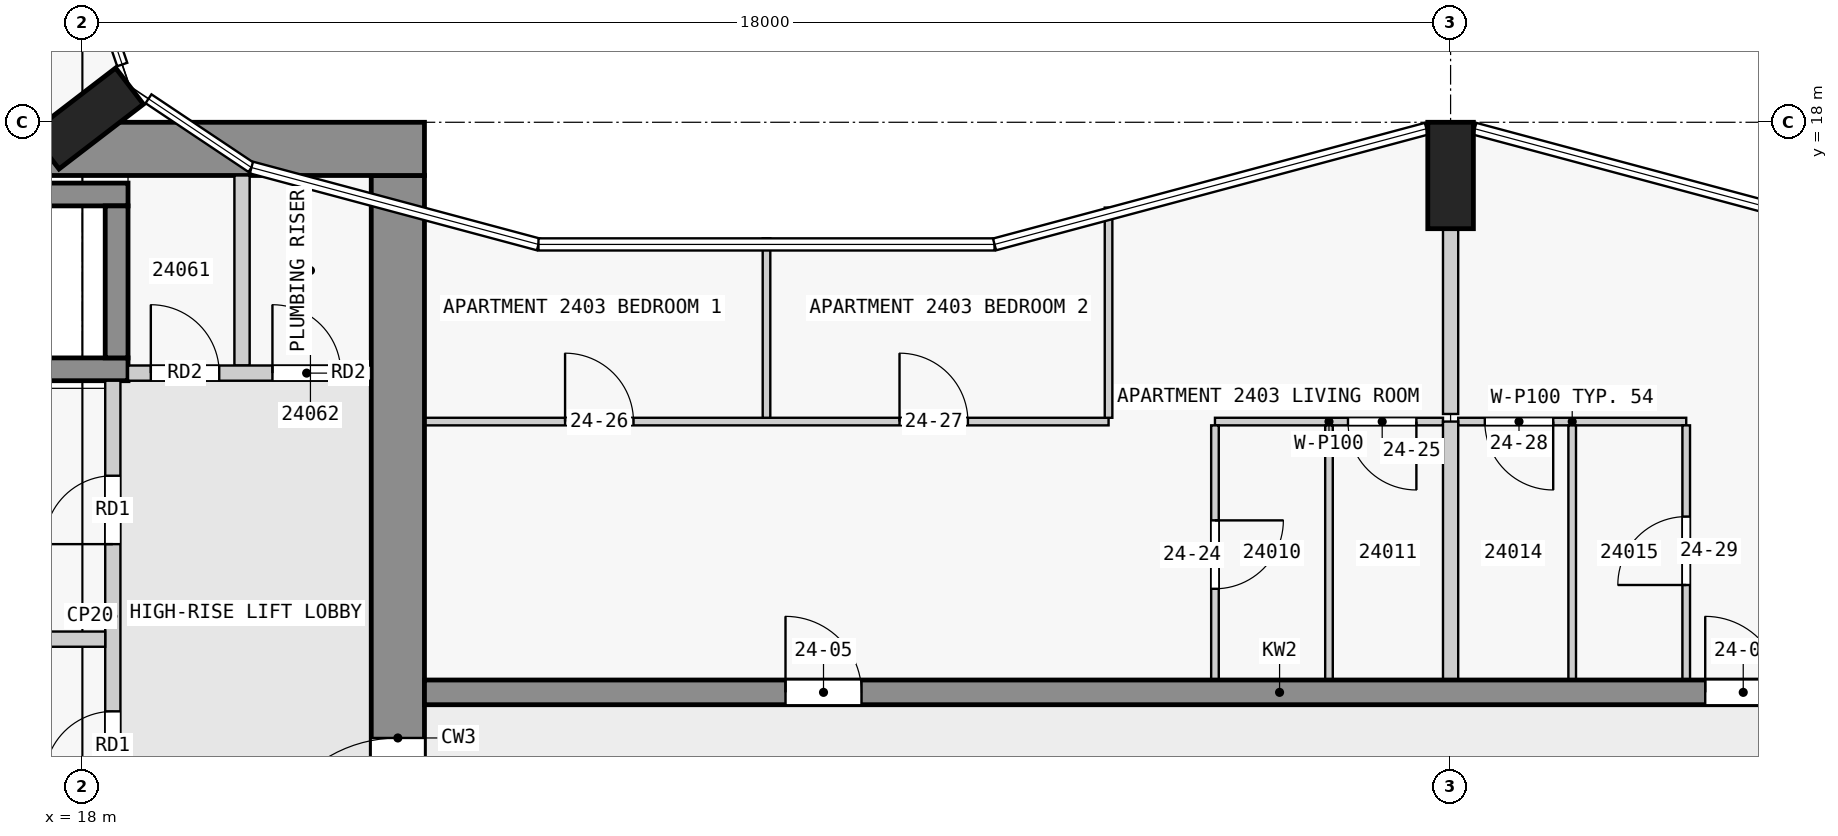
"""IFC4 building model, lengths in metres.
Left out: names, types, materials, properties, quantities, classifications, styles, units other than length and angle.
Written with IfcOpenShell. Run it as: python <this file> out.ifc"""

import sys

from ifc_helpers import new_model, si_unit, direction, frame, frame_2d, origin, origin_2d, place, context, subcontext, project, spatial, rectangle, extrude, element, fill, save


model = new_model("IFC4")
c1 = context("Model", 3, precision=1e-05, world=origin(), true_north=direction((0.0, 1.0)))
c2 = subcontext(c1, "Body", "Model", "MODEL_VIEW")
j1 = project(units=[si_unit("LENGTHUNIT", "METRE"), si_unit("PLANEANGLEUNIT", "RADIAN")], contexts=[c1])
p1 = place(None, origin())
s1 = spatial("IfcSite", under=j1, at=p1, CompositionType="ELEMENT")
p2 = place(p1, origin())
s2 = spatial("IfcBuilding", under=s1, at=p2, CompositionType="ELEMENT")
p3 = place(p2, frame((0.0, 0.0, 95.8)))
s3 = spatial("IfcBuildingStorey", under=s2, at=p3, CompositionType="ELEMENT", Elevation=95.8)
for number, where, z_axis, x_axis in (
    (1, (36.0, 17.3, 0.0), (0.0, 0.0, 1.0), (1.0, 0.0, 0.0)),
    (2, (18.065, 18.05, 0.0), (0.0, 0.0, 1.0), (-0.609, 0.793, 0.0)),
):
    element("IfcColumn", number, at=place(p3, frame(where, z_axis=z_axis, x_axis=x_axis)), inside=s3, PredefinedType="COLUMN", context=c2, shape_type="SweptSolid", body=[
        extrude(rectangle(XDim=0.6, YDim=1.4, at=origin_2d()), origin(), (0.0, 0.0, 1.0), 3.5),
    ])
p4 = place(p3, frame((1.6, 17.65, 0.0), z_axis=(0.0, 0.0, 1.0), x_axis=(1.0, 0.0, 0.0)))
e3 = element("IfcWall", 3, at=p4, inside=s3, PredefinedType="SHEAR", context=c2, shape_type="SweptSolid", body=[
    extrude(rectangle(XDim=20.9, YDim=0.7, at=frame_2d((10.45, 0.0))), origin(), (0.0, 0.0, 1.0), 3.25),
])
p5 = place(p4, frame((6.5, 0.0, 0.0)))
e4 = element("IfcOpeningElement", 4, at=p5, cuts=e3, PredefinedType="OPENING", context=c2, shape_type="SweptSolid", body=[
    extrude(rectangle(XDim=1.8, YDim=2.1, at=frame_2d((0.9, 1.05))), frame((0.0, 0.36, 0.0), z_axis=(0.0, -1.0, 0.0), x_axis=(1.0, 0.0, 0.0)), (0.0, 0.0, 1.0), 0.72),
])
p6 = place(p3, frame((22.15, 2.5, 0.0), z_axis=(0.0, 0.0, 1.0), x_axis=(0.0, 1.0, 0.0)))
e5 = element("IfcWall", 5, at=p6, inside=s3, PredefinedType="SHEAR", context=c2, shape_type="SweptSolid", body=[
    extrude(rectangle(XDim=14.8, YDim=0.7, at=frame_2d((7.4, 0.0))), origin(), (0.0, 0.0, 1.0), 3.25),
])
p7 = place(p6, frame((5.6, 0.0, 0.0)))
e6 = element("IfcOpeningElement", 6, at=p7, cuts=e5, PredefinedType="OPENING", context=c2, shape_type="SweptSolid", body=[
    extrude(rectangle(XDim=1.8, YDim=2.1, at=frame_2d((0.9, 1.05))), frame((0.0, 0.36, 0.0), z_axis=(0.0, -1.0, 0.0), x_axis=(1.0, 0.0, 0.0)), (0.0, 0.0, 1.0), 0.72),
])
for number, where, z_axis, x_axis in (
    (7, (10.8, 17.05, 0.0), (0.0, 0.0, 1.0), (1.0, 0.0, 0.0)),
    (8, (10.8, 14.75, 0.0), (0.0, 0.0, 1.0), (1.0, 0.0, 0.0)),
):
    element("IfcWall", number, at=place(p3, frame(where, z_axis=z_axis, x_axis=x_axis)), inside=s3, PredefinedType="SHEAR", context=c2, shape_type="SweptSolid", body=[
        extrude(rectangle(XDim=7.8, YDim=0.3, at=frame_2d((3.9, 0.0))), origin(), (0.0, 0.0, 1.0), 3.25),
    ])
p8 = place(p3, frame((18.45, 14.9, 0.0), z_axis=(0.0, 0.0, 1.0), x_axis=(0.0, 1.0, 0.0)))
e9 = element("IfcWall", 9, at=p8, inside=s3, PredefinedType="SHEAR", context=c2, shape_type="SweptSolid", body=[
    extrude(rectangle(XDim=2.0, YDim=0.3, at=frame_2d((1.0, 0.0))), origin(), (0.0, 0.0, 1.0), 3.25),
])
p9 = place(p3, frame((22.5, 10.5, 0.0), z_axis=(0.0, 0.0, 1.0), x_axis=(1.0, 0.0, 0.0)))
e10 = element("IfcWall", 10, at=p9, inside=s3, PredefinedType="SHEAR", context=c2, shape_type="SweptSolid", body=[
    extrude(rectangle(XDim=22.5, YDim=0.325, at=frame_2d((11.25, 0.0))), origin(), (0.0, 0.0, 1.0), 3.25),
])
p10 = place(p9, frame((4.75, 0.0, 0.0)))
e11 = element("IfcOpeningElement", 11, at=p10, cuts=e10, PredefinedType="OPENING", context=c2, shape_type="SweptSolid", body=[
    extrude(rectangle(XDim=1.0, YDim=2.1, at=frame_2d((0.5, 1.05))), frame((0.0, 0.172, 0.0), z_axis=(0.0, -1.0, 0.0), x_axis=(1.0, 0.0, 0.0)), (0.0, 0.0, 1.0), 0.345),
])
p11 = place(p9, frame((16.85, 0.0, 0.0)))
e12 = element("IfcOpeningElement", 12, at=p11, cuts=e10, PredefinedType="OPENING", context=c2, shape_type="SweptSolid", body=[
    extrude(rectangle(XDim=1.0, YDim=2.1, at=frame_2d((0.5, 1.05))), frame((0.0, 0.172, 0.0), z_axis=(0.0, -1.0, 0.0), x_axis=(1.0, 0.0, 0.0)), (0.0, 0.0, 1.0), 0.345),
])
p12 = place(p3, frame((18.4, 8.4, 0.0), z_axis=(0.0, 0.0, 1.0), x_axis=(0.0, 1.0, 0.0)))
e13 = element("IfcWall", 13, at=p12, inside=s3, PredefinedType="PARTITIONING", context=c2, shape_type="SweptSolid", body=[
    extrude(rectangle(XDim=6.2, YDim=0.2, at=frame_2d((3.1, 0.0))), origin(), (0.0, 0.0, 1.0), 3.25),
])
p13 = place(p12, frame((0.95, 0.0, 0.0)))
e14 = element("IfcOpeningElement", 14, at=p13, cuts=e13, PredefinedType="OPENING", context=c2, shape_type="SweptSolid", body=[
    extrude(rectangle(XDim=0.9, YDim=2.1, at=frame_2d((0.45, 1.05))), frame((0.0, 0.11, 0.0), z_axis=(0.0, -1.0, 0.0), x_axis=(1.0, 0.0, 0.0)), (0.0, 0.0, 1.0), 0.22),
])
p14 = place(p12, frame((4.05, 0.0, 0.0)))
e15 = element("IfcOpeningElement", 15, at=p14, cuts=e13, PredefinedType="OPENING", context=c2, shape_type="SweptSolid", body=[
    extrude(rectangle(XDim=0.9, YDim=2.1, at=frame_2d((0.45, 1.05))), frame((0.0, 0.11, 0.0), z_axis=(0.0, -1.0, 0.0), x_axis=(1.0, 0.0, 0.0)), (0.0, 0.0, 1.0), 0.22),
])
p15 = place(p3, frame((10.9, 11.2, 0.0), z_axis=(0.0, 0.0, 1.0), x_axis=(1.0, 0.0, 0.0)))
e16 = element("IfcWall", 16, at=p15, inside=s3, PredefinedType="PARTITIONING", context=c2, shape_type="SweptSolid", body=[
    extrude(rectangle(XDim=7.4, YDim=0.2, at=frame_2d((3.7, 0.0))), origin(), (0.0, 0.0, 1.0), 3.25),
])
p16 = place(p3, frame((18.6, 14.7, 0.0), z_axis=(0.0, 0.0, 1.0), x_axis=(1.0, 0.0, 0.0)))
e17 = element("IfcWall", 17, at=p16, inside=s3, PredefinedType="PARTITIONING", context=c2, shape_type="SweptSolid", body=[
    extrude(rectangle(XDim=3.2, YDim=0.2, at=frame_2d((1.6, 0.0))), origin(), (0.0, 0.0, 1.0), 3.25),
])
p17 = place(p16, frame((0.3, 0.0, 0.0)))
e18 = element("IfcOpeningElement", 18, at=p17, cuts=e17, PredefinedType="OPENING", context=c2, shape_type="SweptSolid", body=[
    extrude(rectangle(XDim=0.9, YDim=2.1, at=frame_2d((0.45, 1.05))), frame((0.0, 0.11, 0.0), z_axis=(0.0, -1.0, 0.0), x_axis=(1.0, 0.0, 0.0)), (0.0, 0.0, 1.0), 0.22),
])
p18 = place(p16, frame((1.9, 0.0, 0.0)))
e19 = element("IfcOpeningElement", 19, at=p18, cuts=e17, PredefinedType="OPENING", context=c2, shape_type="SweptSolid", body=[
    extrude(rectangle(XDim=0.9, YDim=2.1, at=frame_2d((0.45, 1.05))), frame((0.0, 0.11, 0.0), z_axis=(0.0, -1.0, 0.0), x_axis=(1.0, 0.0, 0.0)), (0.0, 0.0, 1.0), 0.22),
])
p19 = place(p3, frame((20.1, 14.8, 0.0), z_axis=(0.0, 0.0, 1.0), x_axis=(0.0, 1.0, 0.0)))
e20 = element("IfcWall", 20, at=p19, inside=s3, PredefinedType="PARTITIONING", context=c2, shape_type="SweptSolid", body=[
    extrude(rectangle(XDim=2.5, YDim=0.2, at=frame_2d((1.25, 0.0))), origin(), (0.0, 0.0, 1.0), 3.25),
])
p20 = place(p3, frame((35.9, 14.062, 0.0), z_axis=(0.0, 0.0, 1.0), x_axis=(-1.0, 0.0, 0.0)))
e21 = element("IfcWall", 21, at=p20, inside=s3, PredefinedType="PARTITIONING", context=c2, shape_type="SweptSolid", body=[
    extrude(rectangle(XDim=3.0, YDim=0.1, at=frame_2d((1.5, 0.0))), origin(), (0.0, 0.0, 1.0), 3.25),
])
p21 = place(p20, frame((0.35, 0.0, 0.0)))
e22 = element("IfcOpeningElement", 22, at=p21, cuts=e21, PredefinedType="OPENING", context=c2, shape_type="SweptSolid", body=[
    extrude(rectangle(XDim=0.9, YDim=2.1, at=frame_2d((0.45, 1.05))), frame((0.0, 0.06, 0.0), z_axis=(0.0, -1.0, 0.0), x_axis=(1.0, 0.0, 0.0)), (0.0, 0.0, 1.0), 0.12),
])
p22 = place(p3, frame((39.1, 14.062, 0.0), z_axis=(0.0, 0.0, 1.0), x_axis=(-1.0, 0.0, 0.0)))
e23 = element("IfcWall", 23, at=p22, inside=s3, PredefinedType="PARTITIONING", context=c2, shape_type="SweptSolid", body=[
    extrude(rectangle(XDim=3.0, YDim=0.1, at=frame_2d((1.5, 0.0))), origin(), (0.0, 0.0, 1.0), 3.25),
])
p23 = place(p22, frame((1.75, 0.0, 0.0)))
e24 = element("IfcOpeningElement", 24, at=p23, cuts=e23, PredefinedType="OPENING", context=c2, shape_type="SweptSolid", body=[
    extrude(rectangle(XDim=0.9, YDim=2.1, at=frame_2d((0.45, 1.05))), frame((0.0, 0.06, 0.0), z_axis=(0.0, -1.0, 0.0), x_axis=(1.0, 0.0, 0.0)), (0.0, 0.0, 1.0), 0.12),
])
p24 = place(p3, frame((22.5, 14.062, 0.0), z_axis=(0.0, 0.0, 1.0), x_axis=(1.0, 0.0, 0.0)))
e25 = element("IfcWall", 25, at=p24, inside=s3, PredefinedType="PARTITIONING", context=c2, shape_type="SweptSolid", body=[
    extrude(rectangle(XDim=9.0, YDim=0.1, at=frame_2d((4.5, 0.0))), origin(), (0.0, 0.0, 1.0), 3.25),
])
p25 = place(p24, frame((1.85, 0.0, 0.0)))
e26 = element("IfcOpeningElement", 26, at=p25, cuts=e25, PredefinedType="OPENING", context=c2, shape_type="SweptSolid", body=[
    extrude(rectangle(XDim=0.9, YDim=2.1, at=frame_2d((0.45, 1.05))), frame((0.0, 0.06, 0.0), z_axis=(0.0, -1.0, 0.0), x_axis=(1.0, 0.0, 0.0)), (0.0, 0.0, 1.0), 0.12),
])
p26 = place(p24, frame((6.25, 0.0, 0.0)))
e27 = element("IfcOpeningElement", 27, at=p26, cuts=e25, PredefinedType="OPENING", context=c2, shape_type="SweptSolid", body=[
    extrude(rectangle(XDim=0.9, YDim=2.1, at=frame_2d((0.45, 1.05))), frame((0.0, 0.06, 0.0), z_axis=(0.0, -1.0, 0.0), x_axis=(1.0, 0.0, 0.0)), (0.0, 0.0, 1.0), 0.12),
])
p27 = place(p3, frame((27.0, 14.113, 0.0), z_axis=(0.0, 0.0, 1.0), x_axis=(0.0, 1.0, 0.0)))
e28 = element("IfcWall", 28, at=p27, inside=s3, PredefinedType="PARTITIONING", context=c2, shape_type="SweptSolid", body=[
    extrude(rectangle(XDim=2.361, YDim=0.1, at=frame_2d((1.18, 0.0))), origin(), (0.0, 0.0, 1.0), 3.25),
])
p28 = place(p3, frame((31.5, 14.113, 0.0), z_axis=(0.0, 0.0, 1.0), x_axis=(0.0, 1.0, 0.0)))
e29 = element("IfcWall", 29, at=p28, inside=s3, PredefinedType="PARTITIONING", context=c2, shape_type="SweptSolid", body=[
    extrude(rectangle(XDim=2.765, YDim=0.1, at=frame_2d((1.383, 0.0))), origin(), (0.0, 0.0, 1.0), 3.25),
])
p29 = place(p3, frame((32.9, 14.012, 0.0), z_axis=(0.0, 0.0, 1.0), x_axis=(0.0, -1.0, 0.0)))
e30 = element("IfcWall", 30, at=p29, inside=s3, PredefinedType="PARTITIONING", context=c2, shape_type="SweptSolid", body=[
    extrude(rectangle(XDim=3.35, YDim=0.1, at=frame_2d((1.675, 0.0))), origin(), (0.0, 0.0, 1.0), 3.25),
])
p30 = place(p29, frame((1.25, 0.0, 0.0)))
e31 = element("IfcOpeningElement", 31, at=p30, cuts=e30, PredefinedType="OPENING", context=c2, shape_type="SweptSolid", body=[
    extrude(rectangle(XDim=0.9, YDim=2.1, at=frame_2d((0.45, 1.05))), frame((0.0, 0.06, 0.0), z_axis=(0.0, -1.0, 0.0), x_axis=(1.0, 0.0, 0.0)), (0.0, 0.0, 1.0), 0.12),
])
p31 = place(p3, frame((34.4, 10.663, 0.0), z_axis=(0.0, 0.0, 1.0), x_axis=(0.0, 1.0, 0.0)))
e32 = element("IfcWall", 32, at=p31, inside=s3, PredefinedType="PARTITIONING", context=c2, shape_type="SweptSolid", body=[
    extrude(rectangle(XDim=3.35, YDim=0.1, at=frame_2d((1.675, 0.0))), origin(), (0.0, 0.0, 1.0), 3.25),
])
p32 = place(p3, frame((36.0, 16.6, 0.0), z_axis=(0.0, 0.0, 1.0), x_axis=(0.0, -1.0, 0.0)))
e33 = element("IfcWall", 33, at=p32, inside=s3, PredefinedType="PARTITIONING", context=c2, shape_type="SweptSolid", body=[
    extrude(rectangle(XDim=2.438, YDim=0.2, at=frame_2d((1.219, 0.0))), origin(), (0.0, 0.0, 1.0), 3.25),
])
p33 = place(p3, frame((36.0, 10.663, 0.0), z_axis=(0.0, 0.0, 1.0), x_axis=(0.0, 1.0, 0.0)))
e34 = element("IfcWall", 34, at=p33, inside=s3, PredefinedType="PARTITIONING", context=c2, shape_type="SweptSolid", body=[
    extrude(rectangle(XDim=3.4, YDim=0.2, at=frame_2d((1.7, 0.0))), origin(), (0.0, 0.0, 1.0), 3.25),
])
p34 = place(p3, frame((37.6, 10.663, 0.0), z_axis=(0.0, 0.0, 1.0), x_axis=(0.0, 1.0, 0.0)))
e35 = element("IfcWall", 35, at=p34, inside=s3, PredefinedType="PARTITIONING", context=c2, shape_type="SweptSolid", body=[
    extrude(rectangle(XDim=3.35, YDim=0.1, at=frame_2d((1.675, 0.0))), origin(), (0.0, 0.0, 1.0), 3.25),
])
p35 = place(p3, frame((39.1, 10.663, 0.0), z_axis=(0.0, 0.0, 1.0), x_axis=(0.0, 1.0, 0.0)))
e36 = element("IfcWall", 36, at=p35, inside=s3, PredefinedType="PARTITIONING", context=c2, shape_type="SweptSolid", body=[
    extrude(rectangle(XDim=3.35, YDim=0.1, at=frame_2d((1.675, 0.0))), origin(), (0.0, 0.0, 1.0), 3.25),
])
p36 = place(p35, frame((1.25, 0.0, 0.0)))
e37 = element("IfcOpeningElement", 37, at=p36, cuts=e36, PredefinedType="OPENING", context=c2, shape_type="SweptSolid", body=[
    extrude(rectangle(XDim=0.9, YDim=2.1, at=frame_2d((0.45, 1.05))), frame((0.0, 0.06, 0.0), z_axis=(0.0, -1.0, 0.0), x_axis=(1.0, 0.0, 0.0)), (0.0, 0.0, 1.0), 0.12),
])
p37 = place(p13, origin())
e38 = element("IfcDoor", 38, at=p37, inside=s3, OperationType="SINGLE_SWING_LEFT", PredefinedType="DOOR", context=c2, shape_type="SweptSolid", body=[
    extrude(rectangle(XDim=0.9, YDim=2.1, at=frame_2d((0.45, 1.05))), frame((0.0, 0.025, 0.0), z_axis=(0.0, -1.0, 0.0), x_axis=(1.0, 0.0, 0.0)), (0.0, 0.0, 1.0), 0.05),
])
fill(e14, e38)
p38 = place(p14, origin())
e39 = element("IfcDoor", 39, at=p38, inside=s3, OperationType="SINGLE_SWING_LEFT", PredefinedType="DOOR", context=c2, shape_type="SweptSolid", body=[
    extrude(rectangle(XDim=0.9, YDim=2.1, at=frame_2d((0.45, 1.05))), frame((0.0, 0.025, 0.0), z_axis=(0.0, -1.0, 0.0), x_axis=(1.0, 0.0, 0.0)), (0.0, 0.0, 1.0), 0.05),
])
fill(e15, e39)
p39 = place(p7, origin())
e40 = element("IfcDoor", 40, at=p39, inside=s3, OperationType="DOUBLE_DOOR_SINGLE_SWING", PredefinedType="DOOR", context=c2, shape_type="SweptSolid", body=[
    extrude(rectangle(XDim=1.8, YDim=2.1, at=frame_2d((0.9, 1.05))), frame((0.0, 0.025, 0.0), z_axis=(0.0, -1.0, 0.0), x_axis=(1.0, 0.0, 0.0)), (0.0, 0.0, 1.0), 0.05),
])
fill(e6, e40)
p40 = place(p17, origin())
e41 = element("IfcDoor", 41, at=p40, inside=s3, OperationType="SINGLE_SWING_LEFT", PredefinedType="DOOR", context=c2, shape_type="SweptSolid", body=[
    extrude(rectangle(XDim=0.9, YDim=2.1, at=frame_2d((0.45, 1.05))), frame((0.0, 0.025, 0.0), z_axis=(0.0, -1.0, 0.0), x_axis=(1.0, 0.0, 0.0)), (0.0, 0.0, 1.0), 0.05),
])
fill(e18, e41)
p41 = place(p18, origin())
e42 = element("IfcDoor", 42, at=p41, inside=s3, OperationType="SINGLE_SWING_LEFT", PredefinedType="DOOR", context=c2, shape_type="SweptSolid", body=[
    extrude(rectangle(XDim=0.9, YDim=2.1, at=frame_2d((0.45, 1.05))), frame((0.0, 0.025, 0.0), z_axis=(0.0, -1.0, 0.0), x_axis=(1.0, 0.0, 0.0)), (0.0, 0.0, 1.0), 0.05),
])
fill(e19, e42)
p42 = place(p10, origin())
e43 = element("IfcDoor", 43, at=p42, inside=s3, OperationType="SINGLE_SWING_LEFT", PredefinedType="DOOR", context=c2, shape_type="SweptSolid", body=[
    extrude(rectangle(XDim=1.0, YDim=2.1, at=frame_2d((0.5, 1.05))), frame((0.0, 0.025, 0.0), z_axis=(0.0, -1.0, 0.0), x_axis=(1.0, 0.0, 0.0)), (0.0, 0.0, 1.0), 0.05),
])
fill(e11, e43)
p43 = place(p11, origin())
e44 = element("IfcDoor", 44, at=p43, inside=s3, OperationType="SINGLE_SWING_RIGHT", PredefinedType="DOOR", context=c2, shape_type="SweptSolid", body=[
    extrude(rectangle(XDim=1.0, YDim=2.1, at=frame_2d((0.5, 1.05))), frame((0.0, 0.025, 0.0), z_axis=(0.0, -1.0, 0.0), x_axis=(1.0, 0.0, 0.0)), (0.0, 0.0, 1.0), 0.05),
])
fill(e12, e44)
p44 = place(p30, origin())
e45 = element("IfcDoor", 45, at=p44, inside=s3, OperationType="SINGLE_SWING_RIGHT", PredefinedType="DOOR", context=c2, shape_type="SweptSolid", body=[
    extrude(rectangle(XDim=0.9, YDim=2.1, at=frame_2d((0.45, 1.05))), frame((0.0, 0.025, 0.0), z_axis=(0.0, -1.0, 0.0), x_axis=(1.0, 0.0, 0.0)), (0.0, 0.0, 1.0), 0.05),
])
fill(e31, e45)
p45 = place(p21, origin())
e46 = element("IfcDoor", 46, at=p45, inside=s3, OperationType="SINGLE_SWING_LEFT", PredefinedType="DOOR", context=c2, shape_type="SweptSolid", body=[
    extrude(rectangle(XDim=0.9, YDim=2.1, at=frame_2d((0.45, 1.05))), frame((0.0, 0.025, 0.0), z_axis=(0.0, -1.0, 0.0), x_axis=(1.0, 0.0, 0.0)), (0.0, 0.0, 1.0), 0.05),
])
fill(e22, e46)
p46 = place(p25, origin())
e47 = element("IfcDoor", 47, at=p46, inside=s3, OperationType="SINGLE_SWING_LEFT", PredefinedType="DOOR", context=c2, shape_type="SweptSolid", body=[
    extrude(rectangle(XDim=0.9, YDim=2.1, at=frame_2d((0.45, 1.05))), frame((0.0, 0.025, 0.0), z_axis=(0.0, -1.0, 0.0), x_axis=(1.0, 0.0, 0.0)), (0.0, 0.0, 1.0), 0.05),
])
fill(e26, e47)
p47 = place(p26, origin())
e48 = element("IfcDoor", 48, at=p47, inside=s3, OperationType="SINGLE_SWING_RIGHT", PredefinedType="DOOR", context=c2, shape_type="SweptSolid", body=[
    extrude(rectangle(XDim=0.9, YDim=2.1, at=frame_2d((0.45, 1.05))), frame((0.0, 0.025, 0.0), z_axis=(0.0, -1.0, 0.0), x_axis=(1.0, 0.0, 0.0)), (0.0, 0.0, 1.0), 0.05),
])
fill(e27, e48)
p48 = place(p23, origin())
e49 = element("IfcDoor", 49, at=p48, inside=s3, OperationType="SINGLE_SWING_RIGHT", PredefinedType="DOOR", context=c2, shape_type="SweptSolid", body=[
    extrude(rectangle(XDim=0.9, YDim=2.1, at=frame_2d((0.45, 1.05))), frame((0.0, 0.025, 0.0), z_axis=(0.0, -1.0, 0.0), x_axis=(1.0, 0.0, 0.0)), (0.0, 0.0, 1.0), 0.05),
])
fill(e24, e49)
p49 = place(p36, origin())
e50 = element("IfcDoor", 50, at=p49, inside=s3, OperationType="SINGLE_SWING_RIGHT", PredefinedType="DOOR", context=c2, shape_type="SweptSolid", body=[
    extrude(rectangle(XDim=0.9, YDim=2.1, at=frame_2d((0.45, 1.05))), frame((0.0, 0.025, 0.0), z_axis=(0.0, -1.0, 0.0), x_axis=(1.0, 0.0, 0.0)), (0.0, 0.0, 1.0), 0.05),
])
fill(e37, e50)
save(model, sys.argv[1])
